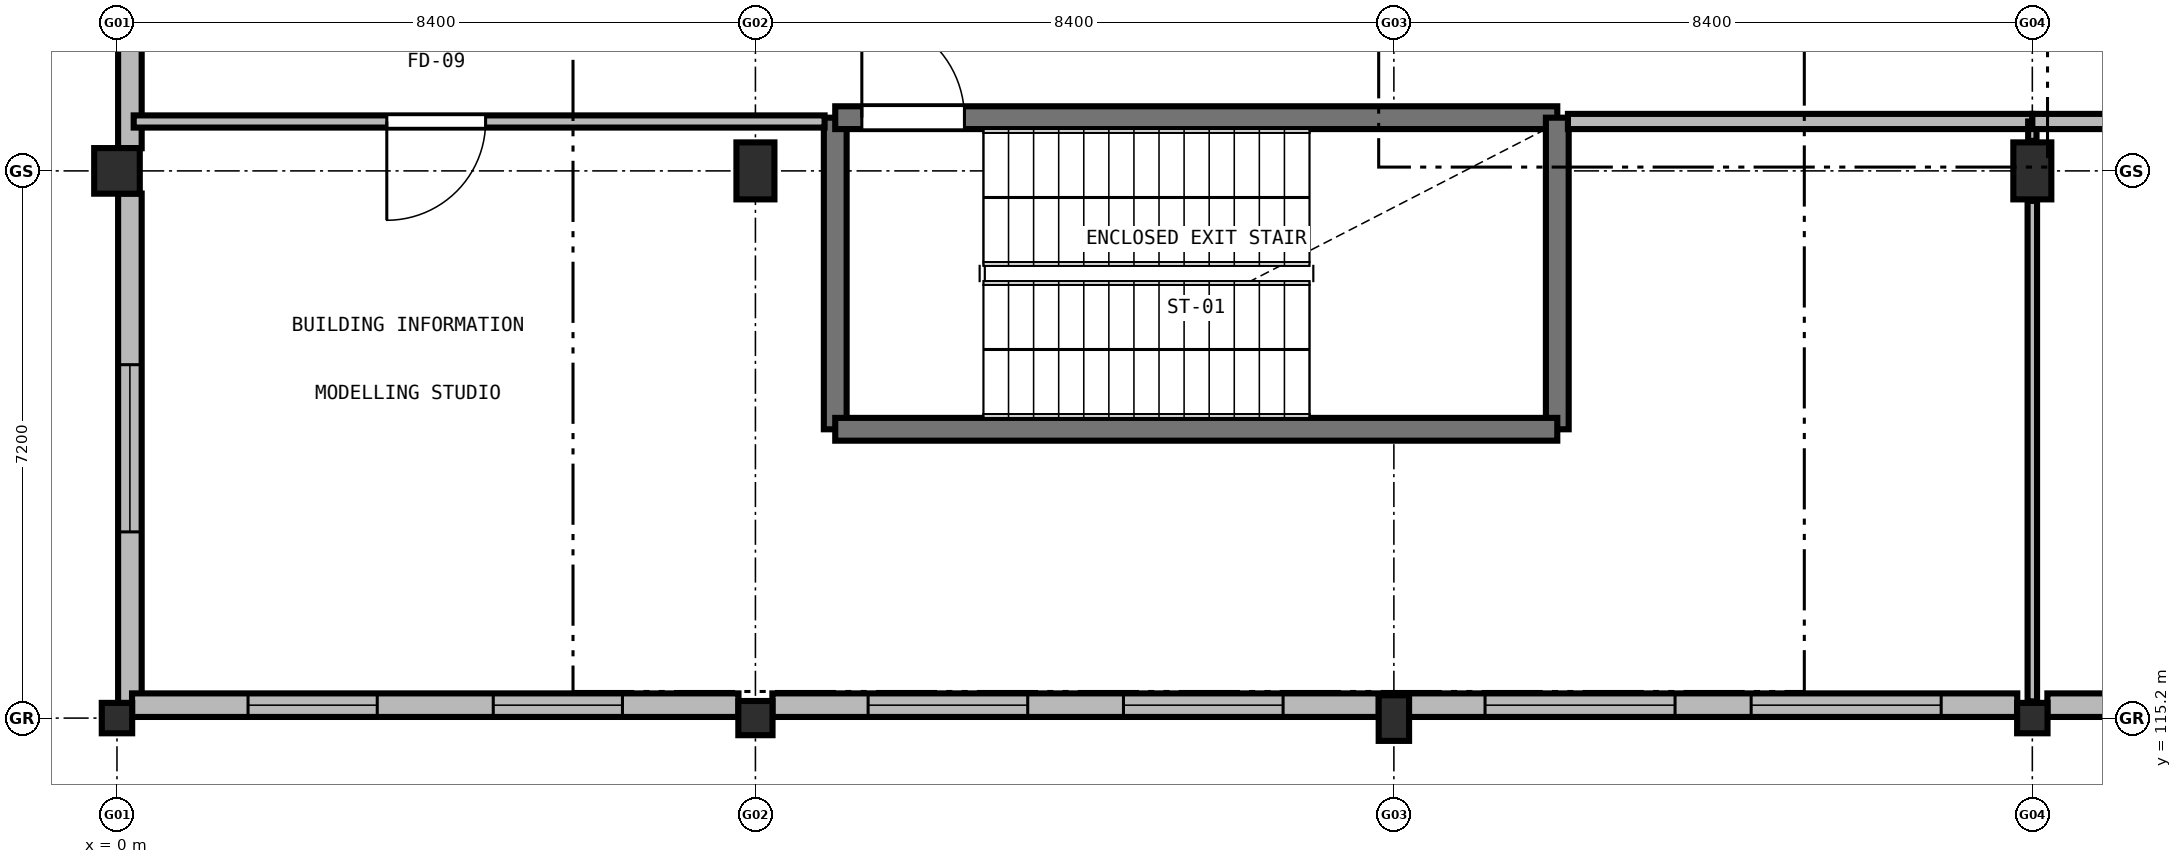
"""IFC4 building model, lengths in metres.
Left out: names, types, materials, properties, quantities, classifications, styles, units other than length and angle.
Written with IfcOpenShell. Run it as: python <this file> out.ifc"""

import sys

from ifc_helpers import new_model, si_unit, direction, frame, frame_2d, origin, origin_2d, place, context, subcontext, project, spatial, rectangle, extrude, element, fill, save


model = new_model("IFC4")
c1 = context("Model", 3, precision=1e-05, world=origin(), true_north=direction((0.0, 1.0)))
c2 = subcontext(c1, "Body", "Model", "MODEL_VIEW")
j1 = project(units=[si_unit("LENGTHUNIT", "METRE"), si_unit("PLANEANGLEUNIT", "RADIAN")], contexts=[c1])
p1 = place(None, origin())
s1 = spatial("IfcSite", under=j1, at=p1, CompositionType="ELEMENT")
p2 = place(p1, origin())
s2 = spatial("IfcBuilding", under=s1, at=p2, CompositionType="ELEMENT")
p3 = place(p2, frame((0.0, 0.0, 17.7)))
s3 = spatial("IfcBuildingStorey", under=s2, at=p3, CompositionType="ELEMENT", Elevation=17.7)
p4 = place(p3, frame((0.0, 115.2, 0.0), z_axis=(0.0, 0.0, 1.0), x_axis=(1.0, 0.0, 0.0)))
e1 = element("IfcColumn", 1, at=p4, inside=s3, PredefinedType="COLUMN", context=c2, shape_type="SweptSolid", body=[
    extrude(rectangle(XDim=0.4, YDim=0.4, at=origin_2d()), origin(), (0.0, 0.0, 1.0), 4.2),
])
p5 = place(p3, frame((0.0, 122.4, 0.0), z_axis=(0.0, 0.0, 1.0), x_axis=(1.0, 0.0, 0.0)))
e2 = element("IfcColumn", 2, at=p5, inside=s3, PredefinedType="COLUMN", context=c2, shape_type="SweptSolid", body=[
    extrude(rectangle(XDim=0.6, YDim=0.6, at=origin_2d()), origin(), (0.0, 0.0, 1.0), 4.2),
])
p6 = place(p3, frame((8.4, 115.2, 0.0), z_axis=(0.0, 0.0, 1.0), x_axis=(1.0, 0.0, 0.0)))
e3 = element("IfcColumn", 3, at=p6, inside=s3, PredefinedType="COLUMN", context=c2, shape_type="SweptSolid", body=[
    extrude(rectangle(XDim=0.45, YDim=0.45, at=origin_2d()), origin(), (0.0, 0.0, 1.0), 4.2),
])
p7 = place(p3, frame((8.4, 122.4, 0.0), z_axis=(0.0, 0.0, 1.0), x_axis=(1.0, 0.0, 0.0)))
e4 = element("IfcColumn", 4, at=p7, inside=s3, PredefinedType="COLUMN", context=c2, shape_type="SweptSolid", body=[
    extrude(rectangle(XDim=0.5, YDim=0.75, at=origin_2d()), origin(), (0.0, 0.0, 1.0), 4.2),
])
p8 = place(p3, frame((16.8, 115.2, 0.0), z_axis=(0.0, 0.0, 1.0), x_axis=(1.0, 0.0, 0.0)))
e5 = element("IfcColumn", 5, at=p8, inside=s3, PredefinedType="COLUMN", context=c2, shape_type="SweptSolid", body=[
    extrude(rectangle(XDim=0.4, YDim=0.6, at=origin_2d()), origin(), (0.0, 0.0, 1.0), 4.2),
])
p9 = place(p3, frame((25.2, 115.2, 0.0), z_axis=(0.0, 0.0, 1.0), x_axis=(1.0, 0.0, 0.0)))
e6 = element("IfcColumn", 6, at=p9, inside=s3, PredefinedType="COLUMN", context=c2, shape_type="SweptSolid", body=[
    extrude(rectangle(XDim=0.4, YDim=0.4, at=origin_2d()), origin(), (0.0, 0.0, 1.0), 4.2),
])
p10 = place(p3, frame((25.2, 122.4, 0.0), z_axis=(0.0, 0.0, 1.0), x_axis=(1.0, 0.0, 0.0)))
e7 = element("IfcColumn", 7, at=p10, inside=s3, PredefinedType="COLUMN", context=c2, shape_type="SweptSolid", body=[
    extrude(rectangle(XDim=0.5, YDim=0.75, at=origin_2d()), origin(), (0.0, 0.0, 1.0), 4.2),
])
p11 = place(p3, frame((0.17, 115.398, 0.0), z_axis=(0.0, 0.0, 1.0), x_axis=(0.0, 1.0, 0.0)))
e8 = element("IfcWall", 8, at=p11, inside=s3, PredefinedType="SOLIDWALL", context=c2, shape_type="SweptSolid", body=[
    extrude(rectangle(XDim=6.704, YDim=0.31, at=frame_2d((3.352, 0.0))), origin(), (0.0, 0.0, 1.0), 3.36),
])
p12 = place(p11, frame((2.252, 0.0, 0.95)))
e9 = element("IfcOpeningElement", 9, at=p12, cuts=e8, PredefinedType="OPENING", context=c2, shape_type="SweptSolid", body=[
    extrude(rectangle(XDim=2.2, YDim=2.1, at=frame_2d((1.1, 1.05))), frame((0.0, 0.165, 0.0), z_axis=(0.0, -1.0, 0.0), x_axis=(1.0, 0.0, 0.0)), (0.0, 0.0, 1.0), 0.33),
])
p13 = place(p3, frame((0.17, 122.698, 0.0), z_axis=(0.0, 0.0, 1.0), x_axis=(0.0, 1.0, 0.0)))
e10 = element("IfcWall", 10, at=p13, inside=s3, PredefinedType="SOLIDWALL", context=c2, shape_type="SweptSolid", body=[
    extrude(rectangle(XDim=6.604, YDim=0.31, at=frame_2d((3.302, 0.0))), origin(), (0.0, 0.0, 1.0), 3.36),
])
p14 = place(p3, frame((33.402, 115.37, 0.0), z_axis=(0.0, 0.0, 1.0), x_axis=(-1.0, 0.0, 0.0)))
e11 = element("IfcWall", 11, at=p14, inside=s3, PredefinedType="SOLIDWALL", context=c2, shape_type="SweptSolid", body=[
    extrude(rectangle(XDim=8.004, YDim=0.31, at=frame_2d((4.002, 0.0))), origin(), (0.0, 0.0, 1.0), 3.25),
])
p15 = place(p14, frame((1.201, 0.0, 0.95)))
e12 = element("IfcOpeningElement", 12, at=p15, cuts=e11, PredefinedType="OPENING", context=c2, shape_type="SweptSolid", body=[
    extrude(rectangle(XDim=2.2, YDim=1.7, at=frame_2d((1.1, 0.85))), frame((0.0, 0.165, 0.0), z_axis=(0.0, -1.0, 0.0), x_axis=(1.0, 0.0, 0.0)), (0.0, 0.0, 1.0), 0.33),
])
p16 = place(p14, frame((4.603, 0.0, 0.95)))
e13 = element("IfcOpeningElement", 13, at=p16, cuts=e11, PredefinedType="OPENING", context=c2, shape_type="SweptSolid", body=[
    extrude(rectangle(XDim=2.2, YDim=1.7, at=frame_2d((1.1, 0.85))), frame((0.0, 0.165, 0.0), z_axis=(0.0, -1.0, 0.0), x_axis=(1.0, 0.0, 0.0)), (0.0, 0.0, 1.0), 0.33),
])
p17 = place(p3, frame((25.002, 115.37, 0.0), z_axis=(0.0, 0.0, 1.0), x_axis=(-1.0, 0.0, 0.0)))
e14 = element("IfcWall", 14, at=p17, inside=s3, PredefinedType="SOLIDWALL", context=c2, shape_type="SweptSolid", body=[
    extrude(rectangle(XDim=8.004, YDim=0.31, at=frame_2d((4.002, 0.0))), origin(), (0.0, 0.0, 1.0), 3.25),
])
p18 = place(p17, frame((1.001, 0.0, 0.95)))
e15 = element("IfcOpeningElement", 15, at=p18, cuts=e14, PredefinedType="OPENING", context=c2, shape_type="SweptSolid", body=[
    extrude(rectangle(XDim=2.5, YDim=2.05, at=frame_2d((1.25, 1.025))), frame((0.0, 0.165, 0.0), z_axis=(0.0, -1.0, 0.0), x_axis=(1.0, 0.0, 0.0)), (0.0, 0.0, 1.0), 0.33),
])
p19 = place(p17, frame((4.503, 0.0, 0.95)))
e16 = element("IfcOpeningElement", 16, at=p19, cuts=e14, PredefinedType="OPENING", context=c2, shape_type="SweptSolid", body=[
    extrude(rectangle(XDim=2.5, YDim=2.05, at=frame_2d((1.25, 1.025))), frame((0.0, 0.165, 0.0), z_axis=(0.0, -1.0, 0.0), x_axis=(1.0, 0.0, 0.0)), (0.0, 0.0, 1.0), 0.33),
])
p20 = place(p3, frame((16.602, 115.37, 0.0), z_axis=(0.0, 0.0, 1.0), x_axis=(-1.0, 0.0, 0.0)))
e17 = element("IfcWall", 17, at=p20, inside=s3, PredefinedType="SOLIDWALL", context=c2, shape_type="SweptSolid", body=[
    extrude(rectangle(XDim=7.979, YDim=0.31, at=frame_2d((3.99, 0.0))), origin(), (0.0, 0.0, 1.0), 3.25),
])
p21 = place(p20, frame((1.26, 0.0, 0.95)))
e18 = element("IfcOpeningElement", 18, at=p21, cuts=e17, PredefinedType="OPENING", context=c2, shape_type="SweptSolid", body=[
    extrude(rectangle(XDim=2.1, YDim=1.85, at=frame_2d((1.05, 0.925))), frame((0.0, 0.165, 0.0), z_axis=(0.0, -1.0, 0.0), x_axis=(1.0, 0.0, 0.0)), (0.0, 0.0, 1.0), 0.33),
])
p22 = place(p20, frame((4.619, 0.0, 0.95)))
e19 = element("IfcOpeningElement", 19, at=p22, cuts=e17, PredefinedType="OPENING", context=c2, shape_type="SweptSolid", body=[
    extrude(rectangle(XDim=2.1, YDim=1.85, at=frame_2d((1.05, 0.925))), frame((0.0, 0.165, 0.0), z_axis=(0.0, -1.0, 0.0), x_axis=(1.0, 0.0, 0.0)), (0.0, 0.0, 1.0), 0.33),
])
p23 = place(p3, frame((8.177, 115.37, 0.0), z_axis=(0.0, 0.0, 1.0), x_axis=(-1.0, 0.0, 0.0)))
e20 = element("IfcWall", 20, at=p23, inside=s3, PredefinedType="SOLIDWALL", context=c2, shape_type="SweptSolid", body=[
    extrude(rectangle(XDim=7.979, YDim=0.31, at=frame_2d((3.99, 0.0))), origin(), (0.0, 0.0, 1.0), 3.25),
])
p24 = place(p23, frame((1.526, 0.0, 0.95)))
e21 = element("IfcOpeningElement", 21, at=p24, cuts=e20, PredefinedType="OPENING", context=c2, shape_type="SweptSolid", body=[
    extrude(rectangle(XDim=1.7, YDim=1.65, at=frame_2d((0.85, 0.825))), frame((0.0, 0.165, 0.0), z_axis=(0.0, -1.0, 0.0), x_axis=(1.0, 0.0, 0.0)), (0.0, 0.0, 1.0), 0.33),
])
p25 = place(p23, frame((4.753, 0.0, 0.95)))
e22 = element("IfcOpeningElement", 22, at=p25, cuts=e20, PredefinedType="OPENING", context=c2, shape_type="SweptSolid", body=[
    extrude(rectangle(XDim=1.7, YDim=1.65, at=frame_2d((0.85, 0.825))), frame((0.0, 0.165, 0.0), z_axis=(0.0, -1.0, 0.0), x_axis=(1.0, 0.0, 0.0)), (0.0, 0.0, 1.0), 0.33),
])
p26 = place(p3, frame((9.45, 119.0, 0.0), z_axis=(0.0, 0.0, 1.0), x_axis=(0.0, 1.0, 0.0)))
e23 = element("IfcWall", 23, at=p26, inside=s3, PredefinedType="SHEAR", context=c2, shape_type="SweptSolid", body=[
    extrude(rectangle(XDim=4.1, YDim=0.3, at=frame_2d((2.05, 0.0))), origin(), (0.0, 0.0, 1.0), 3.88),
])
p27 = place(p3, frame((9.45, 123.1, 0.0), z_axis=(0.0, 0.0, 1.0), x_axis=(1.0, 0.0, 0.0)))
e24 = element("IfcWall", 24, at=p27, inside=s3, PredefinedType="SHEAR", context=c2, shape_type="SweptSolid", body=[
    extrude(rectangle(XDim=9.5, YDim=0.3, at=frame_2d((4.75, 0.0))), origin(), (0.0, 0.0, 1.0), 3.88),
])
p28 = place(p27, frame((0.35, 0.0, 0.0)))
e25 = element("IfcOpeningElement", 25, at=p28, cuts=e24, PredefinedType="OPENING", context=c2, shape_type="SweptSolid", body=[
    extrude(rectangle(XDim=1.35, YDim=2.2, at=frame_2d((0.675, 1.1))), frame((0.0, 0.16, 0.0), z_axis=(0.0, -1.0, 0.0), x_axis=(1.0, 0.0, 0.0)), (0.0, 0.0, 1.0), 0.32),
])
p29 = place(p3, frame((18.95, 123.1, 0.0), z_axis=(0.0, 0.0, 1.0), x_axis=(0.0, -1.0, 0.0)))
e26 = element("IfcWall", 26, at=p29, inside=s3, PredefinedType="SHEAR", context=c2, shape_type="SweptSolid", body=[
    extrude(rectangle(XDim=4.1, YDim=0.3, at=frame_2d((2.05, 0.0))), origin(), (0.0, 0.0, 1.0), 3.88),
])
p30 = place(p3, frame((18.95, 119.0, 0.0), z_axis=(0.0, 0.0, 1.0), x_axis=(-1.0, 0.0, 0.0)))
e27 = element("IfcWall", 27, at=p30, inside=s3, PredefinedType="SHEAR", context=c2, shape_type="SweptSolid", body=[
    extrude(rectangle(XDim=9.5, YDim=0.3, at=frame_2d((4.75, 0.0))), origin(), (0.0, 0.0, 1.0), 3.88),
])
p31 = place(p3, frame((25.2, 123.05, 0.0), z_axis=(0.0, 0.0, 1.0), x_axis=(-1.0, 0.0, 0.0)))
e28 = element("IfcWall", 28, at=p31, inside=s3, PredefinedType="SOLIDWALL", context=c2, shape_type="SweptSolid", body=[
    extrude(rectangle(XDim=6.11, YDim=0.2, at=frame_2d((3.055, 0.0))), origin(), (0.0, 0.0, 1.0), 3.355),
])
p32 = place(p3, frame((9.31, 123.05, 0.0), z_axis=(0.0, 0.0, 1.0), x_axis=(-1.0, 0.0, 0.0)))
e29 = element("IfcWall", 29, at=p32, inside=s3, PredefinedType="PARTITIONING", context=c2, shape_type="SweptSolid", body=[
    extrude(rectangle(XDim=9.09, YDim=0.16, at=frame_2d((4.545, 0.0))), origin(), (0.0, 0.0, 1.0), 3.355),
])
p33 = place(p32, frame((4.46, 0.0, 0.0)))
e30 = element("IfcOpeningElement", 30, at=p33, cuts=e29, PredefinedType="OPENING", context=c2, shape_type="SweptSolid", body=[
    extrude(rectangle(XDim=1.3, YDim=2.15, at=frame_2d((0.65, 1.075))), frame((0.0, 0.09, 0.0), z_axis=(0.0, -1.0, 0.0), x_axis=(1.0, 0.0, 0.0)), (0.0, 0.0, 1.0), 0.18),
])
p34 = place(p3, frame((25.2, 115.42, 0.0), z_axis=(0.0, 0.0, 1.0), x_axis=(0.0, 1.0, 0.0)))
e31 = element("IfcWall", 31, at=p34, inside=s3, PredefinedType="PARTITIONING", context=c2, shape_type="SweptSolid", body=[
    extrude(rectangle(XDim=6.585, YDim=0.125, at=frame_2d((3.292, 0.0))), origin(), (0.0, 0.0, 1.0), 3.225),
])
p35 = place(p3, frame((25.2, 122.795, 0.0), z_axis=(0.0, 0.0, 1.0), x_axis=(0.0, 1.0, 0.0)))
e32 = element("IfcWall", 32, at=p35, inside=s3, PredefinedType="PARTITIONING", context=c2, shape_type="SweptSolid", body=[
    extrude(rectangle(XDim=0.255, YDim=0.11, at=frame_2d((0.127, 0.0))), origin(), (0.0, 0.0, 1.0), 3.225),
])
p36 = place(p3, frame((33.6, 123.05, 0.0), z_axis=(0.0, 0.0, 1.0), x_axis=(-1.0, 0.0, 0.0)))
e33 = element("IfcWall", 33, at=p36, inside=s3, PredefinedType="SOLIDWALL", context=c2, shape_type="SweptSolid", body=[
    extrude(rectangle(XDim=8.4, YDim=0.2, at=frame_2d((4.2, 0.0))), origin(), (0.0, 0.0, 1.0), 3.355),
])
p37 = place(p36, frame((3.675, 0.0, 0.0)))
e34 = element("IfcOpeningElement", 34, at=p37, cuts=e33, PredefinedType="OPENING", context=c2, shape_type="SweptSolid", body=[
    extrude(rectangle(XDim=1.05, YDim=2.15, at=frame_2d((0.525, 1.075))), frame((0.0, 0.11, 0.0), z_axis=(0.0, -1.0, 0.0), x_axis=(1.0, 0.0, 0.0)), (0.0, 0.0, 1.0), 0.22),
])
p38 = place(p12, origin())
e35 = element("IfcWindow", 35, at=p38, inside=s3, PartitioningType="SINGLE_PANEL", PredefinedType="WINDOW", context=c2, shape_type="SweptSolid", body=[
    extrude(rectangle(XDim=2.2, YDim=2.1, at=frame_2d((1.1, 1.05))), frame((0.0, 0.03, 0.0), z_axis=(0.0, -1.0, 0.0), x_axis=(1.0, 0.0, 0.0)), (0.0, 0.0, 1.0), 0.06),
])
fill(e9, e35)
p39 = place(p18, origin())
e36 = element("IfcWindow", 36, at=p39, inside=s3, PartitioningType="SINGLE_PANEL", PredefinedType="WINDOW", context=c2, shape_type="SweptSolid", body=[
    extrude(rectangle(XDim=2.5, YDim=2.05, at=frame_2d((1.25, 1.025))), frame((0.0, 0.03, 0.0), z_axis=(0.0, -1.0, 0.0), x_axis=(1.0, 0.0, 0.0)), (0.0, 0.0, 1.0), 0.06),
])
fill(e15, e36)
p40 = place(p19, origin())
e37 = element("IfcWindow", 37, at=p40, inside=s3, PartitioningType="SINGLE_PANEL", PredefinedType="WINDOW", context=c2, shape_type="SweptSolid", body=[
    extrude(rectangle(XDim=2.5, YDim=2.05, at=frame_2d((1.25, 1.025))), frame((0.0, 0.03, 0.0), z_axis=(0.0, -1.0, 0.0), x_axis=(1.0, 0.0, 0.0)), (0.0, 0.0, 1.0), 0.06),
])
fill(e16, e37)
p41 = place(p21, origin())
e38 = element("IfcWindow", 38, at=p41, inside=s3, PartitioningType="SINGLE_PANEL", PredefinedType="WINDOW", context=c2, shape_type="SweptSolid", body=[
    extrude(rectangle(XDim=2.1, YDim=1.85, at=frame_2d((1.05, 0.925))), frame((0.0, 0.03, 0.0), z_axis=(0.0, -1.0, 0.0), x_axis=(1.0, 0.0, 0.0)), (0.0, 0.0, 1.0), 0.06),
])
fill(e18, e38)
p42 = place(p22, origin())
e39 = element("IfcWindow", 39, at=p42, inside=s3, PartitioningType="SINGLE_PANEL", PredefinedType="WINDOW", context=c2, shape_type="SweptSolid", body=[
    extrude(rectangle(XDim=2.1, YDim=1.85, at=frame_2d((1.05, 0.925))), frame((0.0, 0.03, 0.0), z_axis=(0.0, -1.0, 0.0), x_axis=(1.0, 0.0, 0.0)), (0.0, 0.0, 1.0), 0.06),
])
fill(e19, e39)
p43 = place(p24, origin())
e40 = element("IfcWindow", 40, at=p43, inside=s3, PartitioningType="SINGLE_PANEL", PredefinedType="WINDOW", context=c2, shape_type="SweptSolid", body=[
    extrude(rectangle(XDim=1.7, YDim=1.65, at=frame_2d((0.85, 0.825))), frame((0.0, 0.03, 0.0), z_axis=(0.0, -1.0, 0.0), x_axis=(1.0, 0.0, 0.0)), (0.0, 0.0, 1.0), 0.06),
])
fill(e21, e40)
p44 = place(p25, origin())
e41 = element("IfcWindow", 41, at=p44, inside=s3, PartitioningType="SINGLE_PANEL", PredefinedType="WINDOW", context=c2, shape_type="SweptSolid", body=[
    extrude(rectangle(XDim=1.7, YDim=1.65, at=frame_2d((0.85, 0.825))), frame((0.0, 0.03, 0.0), z_axis=(0.0, -1.0, 0.0), x_axis=(1.0, 0.0, 0.0)), (0.0, 0.0, 1.0), 0.06),
])
fill(e22, e41)
p45 = place(p28, origin())
e42 = element("IfcDoor", 42, at=p45, inside=s3, OperationType="SINGLE_SWING_LEFT", PredefinedType="DOOR", context=c2, shape_type="SweptSolid", body=[
    extrude(rectangle(XDim=1.35, YDim=2.2, at=frame_2d((0.675, 1.1))), frame((0.0, 0.025, 0.0), z_axis=(0.0, -1.0, 0.0), x_axis=(1.0, 0.0, 0.0)), (0.0, 0.0, 1.0), 0.05),
])
fill(e25, e42)
p46 = place(p33, origin())
e43 = element("IfcDoor", 43, at=p46, inside=s3, OperationType="SINGLE_SWING_RIGHT", PredefinedType="DOOR", context=c2, shape_type="SweptSolid", body=[
    extrude(rectangle(XDim=1.3, YDim=2.15, at=frame_2d((0.65, 1.075))), frame((0.0, 0.025, 0.0), z_axis=(0.0, -1.0, 0.0), x_axis=(1.0, 0.0, 0.0)), (0.0, 0.0, 1.0), 0.05),
])
fill(e30, e43)
save(model, sys.argv[1])
